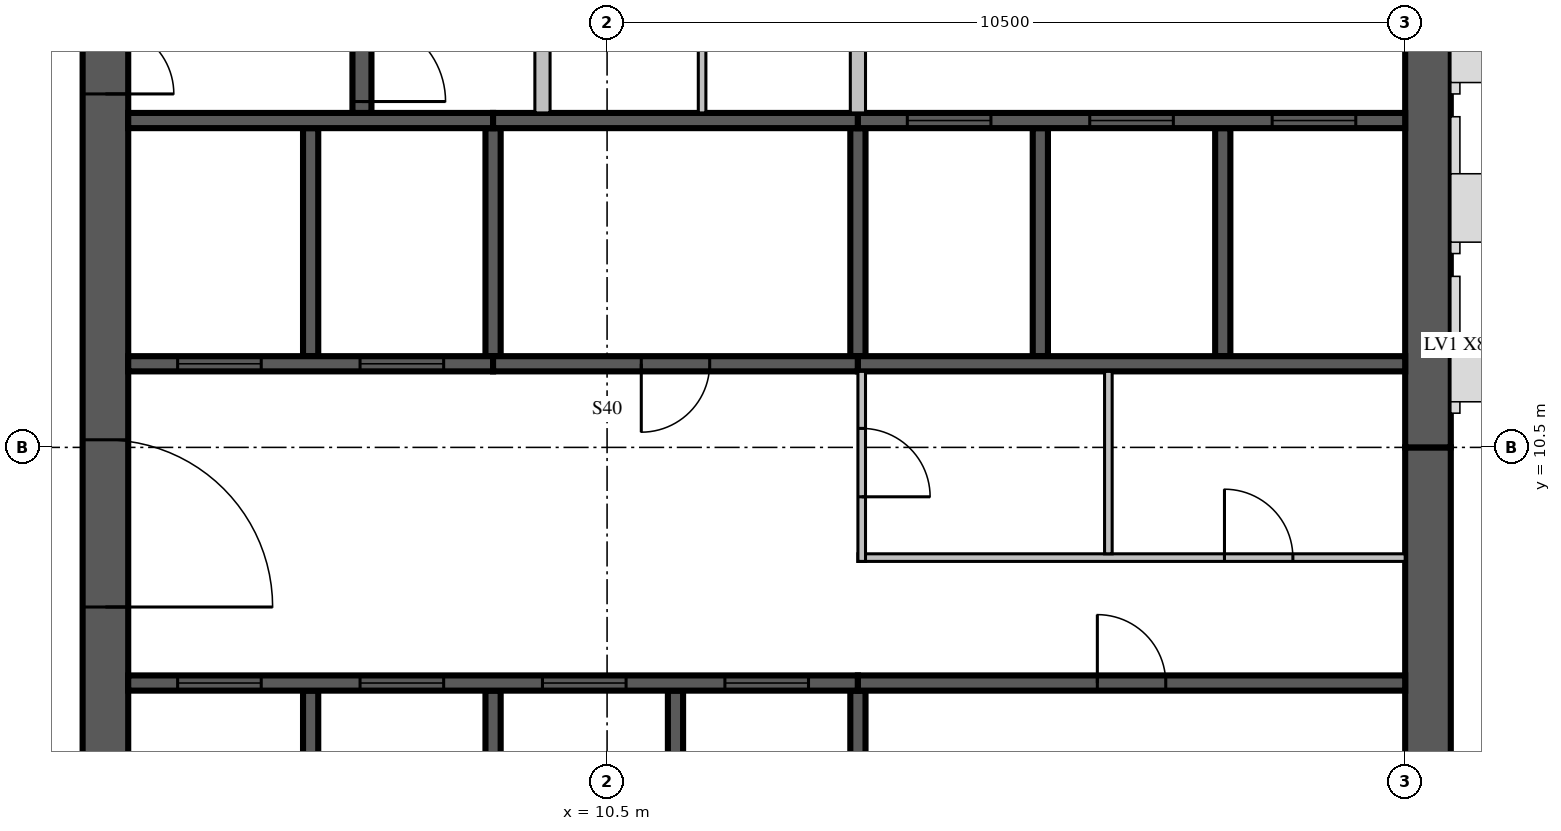
"""IFC4 building model, lengths in metres.
Left out: names, types, materials, properties, quantities, classifications, styles, units other than length and angle.
Written with IfcOpenShell. Run it as: python <this file> out.ifc"""

import sys

from ifc_helpers import new_model, si_unit, direction, frame, frame_2d, origin, place, context, subcontext, project, spatial, rectangle, extrude, source, transform, mapped, element, fill, save


model = new_model("IFC4")
c1 = context("Model", 3, precision=1e-05, world=origin(), true_north=direction((0.0, 1.0)))
c2 = subcontext(c1, "Body", "Model", "MODEL_VIEW")
j1 = project(units=[si_unit("LENGTHUNIT", "METRE"), si_unit("PLANEANGLEUNIT", "RADIAN")], contexts=[c1])
p1 = place(None, origin())
s1 = spatial("IfcSite", under=j1, at=p1, CompositionType="ELEMENT")
p2 = place(p1, origin())
s2 = spatial("IfcBuilding", under=s1, at=p2, CompositionType="ELEMENT")
p3 = place(p2, frame((0.0, 0.0, 302.0)))
s3 = spatial("IfcBuildingStorey", under=s2, at=p3, CompositionType="ELEMENT", Elevation=302.0)
m1 = source(origin(), c2, "Body", "SweptSolid", [
    extrude(rectangle(XDim=17.4, YDim=0.6, at=frame_2d((8.7, 0.0))), origin(), (0.0, 0.0, 1.0), 3.5),
])
p4 = place(p3, frame((3.9, 4.2, 0.0), z_axis=(0.0, 0.0, 1.0), x_axis=(0.0, 1.0, 0.0)))
e1 = element("IfcWall", 1, at=p4, inside=s3, PredefinedType="SHEAR", context=c2, shape_type="MappedRepresentation", body=[
    mapped(m1, transform((0.0, 0.0, 0.0), scale=1.0)),
])
m2 = source(origin(), c2, "Body", "SweptSolid", [
    extrude(rectangle(XDim=2.2, YDim=2.1, at=frame_2d((1.1, 1.05))), frame((0.0, 0.31, 0.0), z_axis=(0.0, -1.0, 0.0), x_axis=(1.0, 0.0, 0.0)), (0.0, 0.0, 1.0), 0.62),
])
p5 = place(p4, frame((4.2, 0.0, 0.0)))
e2 = element("IfcOpeningElement", 2, at=p5, cuts=e1, PredefinedType="OPENING", context=c2, shape_type="MappedRepresentation", body=[
    mapped(m2, transform((0.0, 0.0, 0.0), scale=1.0)),
])
m3 = source(origin(), c2, "Body", "SweptSolid", [
    extrude(rectangle(XDim=0.9, YDim=2.1, at=frame_2d((0.45, 1.05))), frame((0.0, 0.31, 0.0), z_axis=(0.0, -1.0, 0.0), x_axis=(1.0, 0.0, 0.0)), (0.0, 0.0, 1.0), 0.62),
])
p6 = place(p4, frame((10.95, 0.0, 0.0)))
e3 = element("IfcOpeningElement", 3, at=p6, cuts=e1, PredefinedType="OPENING", context=c2, shape_type="MappedRepresentation", body=[
    mapped(m3, transform((0.0, 0.0, 0.0), scale=1.0)),
])
m4 = source(origin(), c2, "Body", "SweptSolid", [
    extrude(rectangle(XDim=6.3, YDim=0.6, at=frame_2d((3.15, 0.0))), origin(), (0.0, 0.0, 1.0), 3.5),
])
p7 = place(p3, frame((21.3, 4.2, 0.0), z_axis=(0.0, 0.0, 1.0), x_axis=(0.0, 1.0, 0.0)))
e4 = element("IfcWall", 4, at=p7, inside=s3, PredefinedType="SHEAR", context=c2, shape_type="MappedRepresentation", body=[
    mapped(m4, transform((0.0, 0.0, 0.0), scale=1.0)),
])
m5 = source(origin(), c2, "Body", "SweptSolid", [
    extrude(rectangle(XDim=10.5, YDim=0.6, at=frame_2d((5.25, 0.0))), origin(), (0.0, 0.0, 1.0), 3.5),
])
p8 = place(p3, frame((21.3, 10.5, 0.0), z_axis=(0.0, 0.0, 1.0), x_axis=(0.0, 1.0, 0.0)))
e5 = element("IfcWall", 5, at=p8, inside=s3, PredefinedType="SHEAR", context=c2, shape_type="MappedRepresentation", body=[
    mapped(m5, transform((0.0, 0.0, 0.0), scale=1.0)),
])
m6 = source(origin(), c2, "Body", "SweptSolid", [
    extrude(rectangle(XDim=1.2, YDim=2.4, at=frame_2d((0.6, 1.2))), frame((0.0, 0.31, 0.0), z_axis=(0.0, -1.0, 0.0), x_axis=(1.0, 0.0, 0.0)), (0.0, 0.0, 1.0), 0.62),
])
p9 = place(p8, frame((5.7, 0.0, 0.6)))
e6 = element("IfcOpeningElement", 6, at=p9, cuts=e5, PredefinedType="OPENING", context=c2, shape_type="MappedRepresentation", body=[
    mapped(m6, transform((0.0, 0.0, 0.0), scale=1.0)),
])
m7 = source(origin(), c2, "Body", "SweptSolid", [
    extrude(rectangle(XDim=3.1, YDim=0.2, at=frame_2d((1.55, 0.0))), origin(), (0.0, 0.0, 1.0), 3.5),
])
for number, where, z_axis, x_axis in (
    (7, (6.6, 4.2, 0.0), (0.0, 0.0, 1.0), (0.0, 1.0, 0.0)),
    (8, (9.0, 4.2, 0.0), (0.0, 0.0, 1.0), (0.0, 1.0, 0.0)),
    (9, (11.4, 4.2, 0.0), (0.0, 0.0, 1.0), (0.0, 1.0, 0.0)),
):
    element("IfcWall", number, at=place(p3, frame(where, z_axis=z_axis, x_axis=x_axis)), inside=s3, PredefinedType="SOLIDWALL", context=c2, shape_type="MappedRepresentation", body=[
        mapped(m7, transform((0.0, 0.0, 0.0), scale=1.0)),
    ])
m8 = source(origin(), c2, "Body", "SweptSolid", [
    extrude(rectangle(XDim=3.1, YDim=0.2, at=frame_2d((1.55, 0.0))), origin(), (0.0, 0.0, 1.0), 3.1),
])
p10 = place(p3, frame((13.8, 4.2, 0.0), z_axis=(0.0, 0.0, 1.0), x_axis=(0.0, 1.0, 0.0)))
e10 = element("IfcWall", 10, at=p10, inside=s3, PredefinedType="SOLIDWALL", context=c2, shape_type="MappedRepresentation", body=[
    mapped(m8, transform((0.0, 0.0, 0.0), scale=1.0)),
])
m9 = source(origin(), c2, "Body", "SweptSolid", [
    extrude(rectangle(XDim=3.0, YDim=0.2, at=frame_2d((1.5, 0.0))), origin(), (0.0, 0.0, 1.0), 3.5),
])
p11 = place(p3, frame((6.6, 11.7, 0.0), z_axis=(0.0, 0.0, 1.0), x_axis=(0.0, 1.0, 0.0)))
e11 = element("IfcWall", 11, at=p11, inside=s3, PredefinedType="SOLIDWALL", context=c2, shape_type="MappedRepresentation", body=[
    mapped(m9, transform((0.0, 0.0, 0.0), scale=1.0)),
])
m10 = source(origin(), c2, "Body", "SweptSolid", [
    extrude(rectangle(XDim=3.0, YDim=0.2, at=frame_2d((1.5, 0.0))), origin(), (0.0, 0.0, 1.0), 3.1),
])
for number, where, z_axis, x_axis in (
    (12, (9.0, 11.7, 0.0), (0.0, 0.0, 1.0), (0.0, 1.0, 0.0)),
    (13, (13.8, 11.7, 0.0), (0.0, 0.0, 1.0), (0.0, 1.0, 0.0)),
):
    element("IfcWall", number, at=place(p3, frame(where, z_axis=z_axis, x_axis=x_axis)), inside=s3, PredefinedType="SOLIDWALL", context=c2, shape_type="MappedRepresentation", body=[
        mapped(m10, transform((0.0, 0.0, 0.0), scale=1.0)),
    ])
for number, where, z_axis, x_axis in (
    (14, (16.2, 11.7, 0.0), (0.0, 0.0, 1.0), (0.0, 1.0, 0.0)),
    (15, (18.6, 11.7, 0.0), (0.0, 0.0, 1.0), (0.0, 1.0, 0.0)),
):
    element("IfcWall", number, at=place(p3, frame(where, z_axis=z_axis, x_axis=x_axis)), inside=s3, PredefinedType="SOLIDWALL", context=c2, shape_type="MappedRepresentation", body=[
        mapped(m9, transform((0.0, 0.0, 0.0), scale=1.0)),
    ])
m11 = source(origin(), c2, "Body", "SweptSolid", [
    extrude(rectangle(XDim=9.6, YDim=0.2, at=frame_2d((4.8, 0.0))), origin(), (0.0, 0.0, 1.0), 3.5),
])
p12 = place(p3, frame((4.2, 7.4, 0.0), z_axis=(0.0, 0.0, 1.0), x_axis=(1.0, 0.0, 0.0)))
e16 = element("IfcWall", 16, at=p12, inside=s3, PredefinedType="SOLIDWALL", context=c2, shape_type="MappedRepresentation", body=[
    mapped(m11, transform((0.0, 0.0, 0.0), scale=1.0)),
])
m12 = source(origin(), c2, "Body", "SweptSolid", [
    extrude(rectangle(XDim=1.1, YDim=2.1, at=frame_2d((0.55, 1.05))), frame((0.0, 0.11, 0.0), z_axis=(0.0, -1.0, 0.0), x_axis=(1.0, 0.0, 0.0)), (0.0, 0.0, 1.0), 0.22),
])
p13 = place(p12, frame((0.65, 0.0, 0.0)))
e17 = element("IfcOpeningElement", 17, at=p13, cuts=e16, PredefinedType="OPENING", context=c2, shape_type="MappedRepresentation", body=[
    mapped(m12, transform((0.0, 0.0, 0.0), scale=1.0)),
])
p14 = place(p12, frame((3.05, 0.0, 0.0)))
e18 = element("IfcOpeningElement", 18, at=p14, cuts=e16, PredefinedType="OPENING", context=c2, shape_type="MappedRepresentation", body=[
    mapped(m12, transform((0.0, 0.0, 0.0), scale=1.0)),
])
p15 = place(p12, frame((5.45, 0.0, 0.0)))
e19 = element("IfcOpeningElement", 19, at=p15, cuts=e16, PredefinedType="OPENING", context=c2, shape_type="MappedRepresentation", body=[
    mapped(m12, transform((0.0, 0.0, 0.0), scale=1.0)),
])
p16 = place(p12, frame((7.85, 0.0, 0.0)))
e20 = element("IfcOpeningElement", 20, at=p16, cuts=e16, PredefinedType="OPENING", context=c2, shape_type="MappedRepresentation", body=[
    mapped(m12, transform((0.0, 0.0, 0.0), scale=1.0)),
])
m13 = source(origin(), c2, "Body", "SweptSolid", [
    extrude(rectangle(XDim=7.2, YDim=0.2, at=frame_2d((3.6, 0.0))), origin(), (0.0, 0.0, 1.0), 3.1),
])
p17 = place(p3, frame((13.8, 7.4, 0.0), z_axis=(0.0, 0.0, 1.0), x_axis=(1.0, 0.0, 0.0)))
e21 = element("IfcWall", 21, at=p17, inside=s3, PredefinedType="SOLIDWALL", context=c2, shape_type="MappedRepresentation", body=[
    mapped(m13, transform((0.0, 0.0, 0.0), scale=1.0)),
])
m14 = source(origin(), c2, "Body", "SweptSolid", [
    extrude(rectangle(XDim=0.9, YDim=2.1, at=frame_2d((0.45, 1.05))), frame((0.0, 0.11, 0.0), z_axis=(0.0, -1.0, 0.0), x_axis=(1.0, 0.0, 0.0)), (0.0, 0.0, 1.0), 0.22),
])
p18 = place(p17, frame((3.15, 0.0, 0.0)))
e22 = element("IfcOpeningElement", 22, at=p18, cuts=e21, PredefinedType="OPENING", context=c2, shape_type="MappedRepresentation", body=[
    mapped(m14, transform((0.0, 0.0, 0.0), scale=1.0)),
])
m15 = source(origin(), c2, "Body", "SweptSolid", [
    extrude(rectangle(XDim=4.8, YDim=0.2, at=frame_2d((2.4, 0.0))), origin(), (0.0, 0.0, 1.0), 3.5),
])
p19 = place(p3, frame((4.2, 11.6, 0.0), z_axis=(0.0, 0.0, 1.0), x_axis=(1.0, 0.0, 0.0)))
e23 = element("IfcWall", 23, at=p19, inside=s3, PredefinedType="SOLIDWALL", context=c2, shape_type="MappedRepresentation", body=[
    mapped(m15, transform((0.0, 0.0, 0.0), scale=1.0)),
])
p20 = place(p19, frame((0.65, 0.0, 0.0)))
e24 = element("IfcOpeningElement", 24, at=p20, cuts=e23, PredefinedType="OPENING", context=c2, shape_type="MappedRepresentation", body=[
    mapped(m12, transform((0.0, 0.0, 0.0), scale=1.0)),
])
p21 = place(p19, frame((3.05, 0.0, 0.0)))
e25 = element("IfcOpeningElement", 25, at=p21, cuts=e23, PredefinedType="OPENING", context=c2, shape_type="MappedRepresentation", body=[
    mapped(m12, transform((0.0, 0.0, 0.0), scale=1.0)),
])
m16 = source(origin(), c2, "Body", "SweptSolid", [
    extrude(rectangle(XDim=4.8, YDim=0.2, at=frame_2d((2.4, 0.0))), origin(), (0.0, 0.0, 1.0), 3.1),
])
p22 = place(p3, frame((9.0, 11.6, 0.0), z_axis=(0.0, 0.0, 1.0), x_axis=(1.0, 0.0, 0.0)))
e26 = element("IfcWall", 26, at=p22, inside=s3, PredefinedType="SOLIDWALL", context=c2, shape_type="MappedRepresentation", body=[
    mapped(m16, transform((0.0, 0.0, 0.0), scale=1.0)),
])
p23 = place(p22, frame((1.95, 0.0, 0.0)))
e27 = element("IfcOpeningElement", 27, at=p23, cuts=e26, PredefinedType="OPENING", context=c2, shape_type="MappedRepresentation", body=[
    mapped(m14, transform((0.0, 0.0, 0.0), scale=1.0)),
])
m17 = source(origin(), c2, "Body", "SweptSolid", [
    extrude(rectangle(XDim=7.2, YDim=0.2, at=frame_2d((3.6, 0.0))), origin(), (0.0, 0.0, 1.0), 3.5),
])
p24 = place(p3, frame((13.8, 11.6, 0.0), z_axis=(0.0, 0.0, 1.0), x_axis=(1.0, 0.0, 0.0)))
e28 = element("IfcWall", 28, at=p24, inside=s3, PredefinedType="SOLIDWALL", context=c2, shape_type="MappedRepresentation", body=[
    mapped(m17, transform((0.0, 0.0, 0.0), scale=1.0)),
])
p25 = place(p3, frame((4.2, 14.8, 0.0), z_axis=(0.0, 0.0, 1.0), x_axis=(1.0, 0.0, 0.0)))
e29 = element("IfcWall", 29, at=p25, inside=s3, PredefinedType="SOLIDWALL", context=c2, shape_type="MappedRepresentation", body=[
    mapped(m15, transform((0.0, 0.0, 0.0), scale=1.0)),
])
p26 = place(p3, frame((9.0, 14.8, 0.0), z_axis=(0.0, 0.0, 1.0), x_axis=(1.0, 0.0, 0.0)))
e30 = element("IfcWall", 30, at=p26, inside=s3, PredefinedType="SOLIDWALL", context=c2, shape_type="MappedRepresentation", body=[
    mapped(m16, transform((0.0, 0.0, 0.0), scale=1.0)),
])
p27 = place(p3, frame((13.8, 14.8, 0.0), z_axis=(0.0, 0.0, 1.0), x_axis=(1.0, 0.0, 0.0)))
e31 = element("IfcWall", 31, at=p27, inside=s3, PredefinedType="SOLIDWALL", context=c2, shape_type="MappedRepresentation", body=[
    mapped(m17, transform((0.0, 0.0, 0.0), scale=1.0)),
])
p28 = place(p27, frame((0.65, 0.0, 0.0)))
e32 = element("IfcOpeningElement", 32, at=p28, cuts=e31, PredefinedType="OPENING", context=c2, shape_type="MappedRepresentation", body=[
    mapped(m12, transform((0.0, 0.0, 0.0), scale=1.0)),
])
p29 = place(p27, frame((3.05, 0.0, 0.0)))
e33 = element("IfcOpeningElement", 33, at=p29, cuts=e31, PredefinedType="OPENING", context=c2, shape_type="MappedRepresentation", body=[
    mapped(m12, transform((0.0, 0.0, 0.0), scale=1.0)),
])
p30 = place(p27, frame((5.45, 0.0, 0.0)))
e34 = element("IfcOpeningElement", 34, at=p30, cuts=e31, PredefinedType="OPENING", context=c2, shape_type="MappedRepresentation", body=[
    mapped(m12, transform((0.0, 0.0, 0.0), scale=1.0)),
])
m18 = source(origin(), c2, "Body", "SweptSolid", [
    extrude(rectangle(XDim=6.6, YDim=0.25, at=frame_2d((3.3, 0.0))), origin(), (0.0, 0.0, 1.0), 3.1),
])
p31 = place(p3, frame((7.275, 14.9, 0.0), z_axis=(0.0, 0.0, 1.0), x_axis=(0.0, 1.0, 0.0)))
e35 = element("IfcWall", 35, at=p31, inside=s3, PredefinedType="SOLIDWALL", context=c2, shape_type="MappedRepresentation", body=[
    mapped(m18, transform((0.0, 0.0, 0.0), scale=1.0)),
])
m19 = source(origin(), c2, "Body", "SweptSolid", [
    extrude(rectangle(XDim=1.1, YDim=2.1, at=frame_2d((0.55, 1.05))), frame((0.0, 0.135, 0.0), z_axis=(0.0, -1.0, 0.0), x_axis=(1.0, 0.0, 0.0)), (0.0, 0.0, 1.0), 0.27),
])
p32 = place(p31, frame((0.15, 0.0, 0.0)))
e36 = element("IfcOpeningElement", 36, at=p32, cuts=e35, PredefinedType="OPENING", context=c2, shape_type="MappedRepresentation", body=[
    mapped(m19, transform((0.0, 0.0, 0.0), scale=1.0)),
])
m20 = source(origin(), c2, "Body", "SweptSolid", [
    extrude(rectangle(XDim=3.0, YDim=0.2, at=frame_2d((1.5, 0.0))), origin(), (0.0, 0.0, 1.0), 3.1),
])
p33 = place(p3, frame((9.65, 14.9, 0.0), z_axis=(0.0, 0.0, 1.0), x_axis=(0.0, 1.0, 0.0)))
e37 = element("IfcWall", 37, at=p33, inside=s3, PredefinedType="PARTITIONING", context=c2, shape_type="MappedRepresentation", body=[
    mapped(m20, transform((0.0, 0.0, 0.0), scale=1.0)),
])
m21 = source(origin(), c2, "Body", "SweptSolid", [
    extrude(rectangle(XDim=7.2, YDim=0.1, at=frame_2d((3.6, 0.0))), origin(), (0.0, 0.0, 1.0), 3.1),
])
p34 = place(p3, frame((13.8, 9.05, 0.0), z_axis=(0.0, 0.0, 1.0), x_axis=(1.0, 0.0, 0.0)))
e38 = element("IfcWall", 38, at=p34, inside=s3, PredefinedType="PARTITIONING", context=c2, shape_type="MappedRepresentation", body=[
    mapped(m21, transform((0.0, 0.0, 0.0), scale=1.0)),
])
m22 = source(origin(), c2, "Body", "SweptSolid", [
    extrude(rectangle(XDim=0.9, YDim=2.1, at=frame_2d((0.45, 1.05))), frame((0.0, 0.06, 0.0), z_axis=(0.0, -1.0, 0.0), x_axis=(1.0, 0.0, 0.0)), (0.0, 0.0, 1.0), 0.12),
])
p35 = place(p34, frame((4.822, 0.0, 0.0)))
e39 = element("IfcOpeningElement", 39, at=p35, cuts=e38, PredefinedType="OPENING", context=c2, shape_type="MappedRepresentation", body=[
    mapped(m22, transform((0.0, 0.0, 0.0), scale=1.0)),
])
m23 = source(origin(), c2, "Body", "SweptSolid", [
    extrude(rectangle(XDim=2.5, YDim=0.1, at=frame_2d((1.25, 0.0))), origin(), (0.0, 0.0, 1.0), 3.1),
])
p36 = place(p3, frame((13.85, 9.0, 0.0), z_axis=(0.0, 0.0, 1.0), x_axis=(0.0, 1.0, 0.0)))
e40 = element("IfcWall", 40, at=p36, inside=s3, PredefinedType="PARTITIONING", context=c2, shape_type="MappedRepresentation", body=[
    mapped(m23, transform((0.0, 0.0, 0.0), scale=1.0)),
])
p37 = place(p36, frame((0.85, 0.0, 0.0)))
e41 = element("IfcOpeningElement", 41, at=p37, cuts=e40, PredefinedType="OPENING", context=c2, shape_type="MappedRepresentation", body=[
    mapped(m22, transform((0.0, 0.0, 0.0), scale=1.0)),
])
m24 = source(origin(), c2, "Body", "SweptSolid", [
    extrude(rectangle(XDim=2.4, YDim=0.1, at=frame_2d((1.2, 0.0))), origin(), (0.0, 0.0, 1.0), 3.1),
])
p38 = place(p3, frame((17.095, 9.1, 0.0), z_axis=(0.0, 0.0, 1.0), x_axis=(0.0, 1.0, 0.0)))
e42 = element("IfcWall", 42, at=p38, inside=s3, PredefinedType="PARTITIONING", context=c2, shape_type="MappedRepresentation", body=[
    mapped(m24, transform((0.0, 0.0, 0.0), scale=1.0)),
])
p39 = place(p3, frame((13.8, 14.9, 0.0), z_axis=(0.0, 0.0, 1.0), x_axis=(0.0, 1.0, 0.0)))
e43 = element("IfcWall", 43, at=p39, inside=s3, PredefinedType="PARTITIONING", context=c2, shape_type="MappedRepresentation", body=[
    mapped(m20, transform((0.0, 0.0, 0.0), scale=1.0)),
])
m25 = source(origin(), c2, "Body", "SweptSolid", [
    extrude(rectangle(XDim=3.0, YDim=0.1, at=frame_2d((1.5, 0.0))), origin(), (0.0, 0.0, 1.0), 3.1),
])
p40 = place(p3, frame((11.75, 14.9, 0.0), z_axis=(0.0, 0.0, 1.0), x_axis=(0.0, 1.0, 0.0)))
e44 = element("IfcWall", 44, at=p40, inside=s3, PredefinedType="PARTITIONING", context=c2, shape_type="MappedRepresentation", body=[
    mapped(m25, transform((0.0, 0.0, 0.0), scale=1.0)),
])
m26 = source(origin(), c2, "Body", "SweptSolid", [
    extrude(rectangle(XDim=1.1, YDim=2.1, at=frame_2d((0.55, 1.05))), frame((0.0, 0.025, 0.0), z_axis=(0.0, -1.0, 0.0), x_axis=(1.0, 0.0, 0.0)), (0.0, 0.0, 1.0), 0.05),
])
p41 = place(p13, origin())
e45 = element("IfcDoor", 45, at=p41, inside=s3, OperationType="SLIDING_TO_LEFT", PredefinedType="DOOR", context=c2, shape_type="MappedRepresentation", body=[
    mapped(m26, transform((0.0, 0.0, 0.0), scale=1.0)),
])
fill(e17, e45)
p42 = place(p14, origin())
e46 = element("IfcDoor", 46, at=p42, inside=s3, OperationType="SLIDING_TO_LEFT", PredefinedType="DOOR", context=c2, shape_type="MappedRepresentation", body=[
    mapped(m26, transform((0.0, 0.0, 0.0), scale=1.0)),
])
fill(e18, e46)
p43 = place(p15, origin())
e47 = element("IfcDoor", 47, at=p43, inside=s3, OperationType="SLIDING_TO_LEFT", PredefinedType="DOOR", context=c2, shape_type="MappedRepresentation", body=[
    mapped(m26, transform((0.0, 0.0, 0.0), scale=1.0)),
])
fill(e19, e47)
p44 = place(p16, origin())
e48 = element("IfcDoor", 48, at=p44, inside=s3, OperationType="SLIDING_TO_LEFT", PredefinedType="DOOR", context=c2, shape_type="MappedRepresentation", body=[
    mapped(m26, transform((0.0, 0.0, 0.0), scale=1.0)),
])
fill(e20, e48)
m27 = source(origin(), c2, "Body", "SweptSolid", [
    extrude(rectangle(XDim=0.9, YDim=2.1, at=frame_2d((0.45, 1.05))), frame((0.0, 0.025, 0.0), z_axis=(0.0, -1.0, 0.0), x_axis=(1.0, 0.0, 0.0)), (0.0, 0.0, 1.0), 0.05),
])
p45 = place(p18, origin())
e49 = element("IfcDoor", 49, at=p45, inside=s3, OperationType="SINGLE_SWING_LEFT", PredefinedType="DOOR", context=c2, shape_type="MappedRepresentation", body=[
    mapped(m27, transform((0.0, 0.0, 0.0), scale=1.0)),
])
fill(e22, e49)
p46 = place(p20, origin())
e50 = element("IfcDoor", 50, at=p46, inside=s3, OperationType="SLIDING_TO_LEFT", PredefinedType="DOOR", context=c2, shape_type="MappedRepresentation", body=[
    mapped(m26, transform((0.0, 0.0, 0.0), scale=1.0)),
])
fill(e24, e50)
p47 = place(p21, origin())
e51 = element("IfcDoor", 51, at=p47, inside=s3, OperationType="SLIDING_TO_LEFT", PredefinedType="DOOR", context=c2, shape_type="MappedRepresentation", body=[
    mapped(m26, transform((0.0, 0.0, 0.0), scale=1.0)),
])
fill(e25, e51)
p48 = place(p23, origin())
e52 = element("IfcDoor", 52, at=p48, inside=s3, OperationType="SINGLE_SWING_RIGHT", PredefinedType="DOOR", context=c2, shape_type="MappedRepresentation", body=[
    mapped(m27, transform((0.0, 0.0, 0.0), scale=1.0)),
])
fill(e27, e52)
p49 = place(p28, origin())
e53 = element("IfcDoor", 53, at=p49, inside=s3, OperationType="SLIDING_TO_LEFT", PredefinedType="DOOR", context=c2, shape_type="MappedRepresentation", body=[
    mapped(m26, transform((0.0, 0.0, 0.0), scale=1.0)),
])
fill(e32, e53)
p50 = place(p29, origin())
e54 = element("IfcDoor", 54, at=p50, inside=s3, OperationType="SLIDING_TO_LEFT", PredefinedType="DOOR", context=c2, shape_type="MappedRepresentation", body=[
    mapped(m26, transform((0.0, 0.0, 0.0), scale=1.0)),
])
fill(e33, e54)
p51 = place(p30, origin())
e55 = element("IfcDoor", 55, at=p51, inside=s3, OperationType="SLIDING_TO_LEFT", PredefinedType="DOOR", context=c2, shape_type="MappedRepresentation", body=[
    mapped(m26, transform((0.0, 0.0, 0.0), scale=1.0)),
])
fill(e34, e55)
p52 = place(p32, origin())
e56 = element("IfcDoor", 56, at=p52, inside=s3, OperationType="SINGLE_SWING_RIGHT", PredefinedType="DOOR", context=c2, shape_type="MappedRepresentation", body=[
    mapped(m26, transform((0.0, 0.0, 0.0), scale=1.0)),
])
fill(e36, e56)
p53 = place(p35, origin())
e57 = element("IfcDoor", 57, at=p53, inside=s3, OperationType="SINGLE_SWING_LEFT", PredefinedType="DOOR", context=c2, shape_type="MappedRepresentation", body=[
    mapped(m27, transform((0.0, 0.0, 0.0), scale=1.0)),
])
fill(e39, e57)
p54 = place(p37, origin())
e58 = element("IfcDoor", 58, at=p54, inside=s3, OperationType="SINGLE_SWING_RIGHT", PredefinedType="DOOR", context=c2, shape_type="MappedRepresentation", body=[
    mapped(m27, transform((0.0, 0.0, 0.0), scale=1.0)),
])
fill(e41, e58)
m28 = source(origin(), c2, "Body", "SweptSolid", [
    extrude(rectangle(XDim=2.2, YDim=2.1, at=frame_2d((1.1, 1.05))), frame((0.0, 0.025, 0.0), z_axis=(0.0, -1.0, 0.0), x_axis=(1.0, 0.0, 0.0)), (0.0, 0.0, 1.0), 0.05),
])
p55 = place(p5, origin())
e59 = element("IfcDoor", 59, at=p55, inside=s3, OperationType="DOUBLE_DOOR_SINGLE_SWING", PredefinedType="DOOR", context=c2, shape_type="MappedRepresentation", body=[
    mapped(m28, transform((0.0, 0.0, 0.0), scale=1.0)),
])
fill(e2, e59)
p56 = place(p6, origin())
e60 = element("IfcDoor", 60, at=p56, inside=s3, OperationType="SINGLE_SWING_RIGHT", PredefinedType="DOOR", context=c2, shape_type="MappedRepresentation", body=[
    mapped(m27, transform((0.0, 0.0, 0.0), scale=1.0)),
])
fill(e3, e60)
save(model, sys.argv[1])
